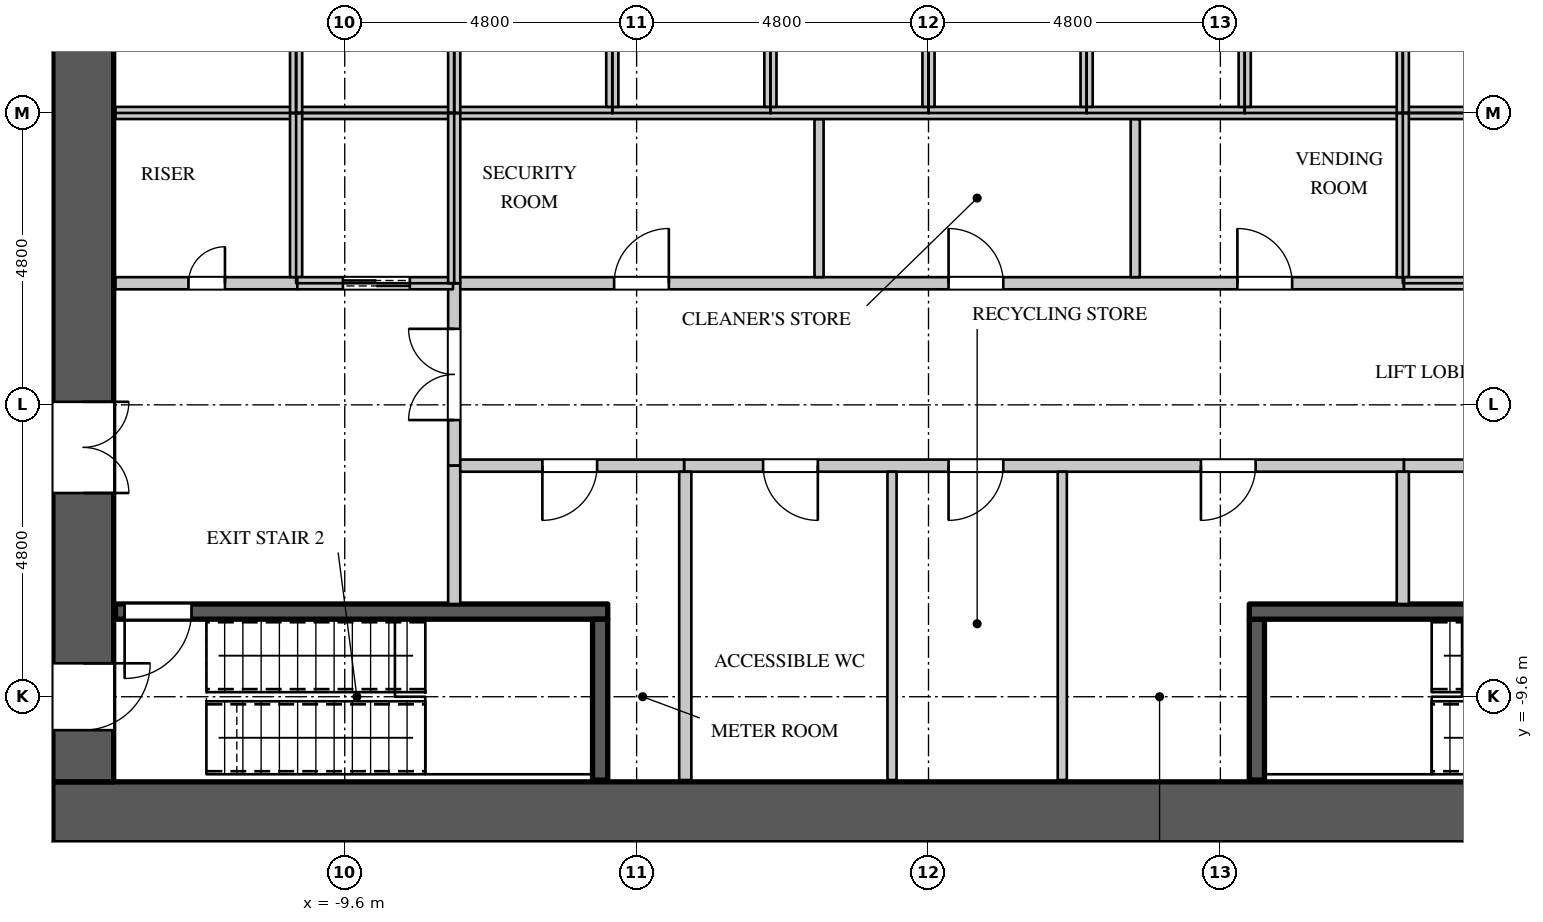
"""IFC4 building model, lengths in metres.
Left out: names, types, materials, properties, quantities, classifications, styles, units other than length and angle.
Written with IfcOpenShell. Run it as: python <this file> out.ifc"""

import sys

from ifc_helpers import new_model, si_unit, direction, frame, frame_2d, origin, place, context, subcontext, project, spatial, rectangle, extrude, element, fill, save


model = new_model("IFC4")
c1 = context("Model", 3, precision=1e-05, world=origin(), true_north=direction((0.0, 1.0)))
c2 = subcontext(c1, "Body", "Model", "MODEL_VIEW")
j1 = project(units=[si_unit("LENGTHUNIT", "METRE"), si_unit("PLANEANGLEUNIT", "RADIAN")], contexts=[c1])
p1 = place(None, origin())
s1 = spatial("IfcSite", under=j1, at=p1, CompositionType="ELEMENT")
p2 = place(p1, origin())
s2 = spatial("IfcBuilding", under=s1, at=p2, CompositionType="ELEMENT")
p3 = place(p2, frame((0.0, 0.0, 50.7)))
s3 = spatial("IfcBuildingStorey", under=s2, at=p3, CompositionType="ELEMENT", Elevation=50.7)
p4 = place(p3, frame((-14.4, -11.5, 0.0), z_axis=(0.0, 0.0, 1.0), x_axis=(1.0, 0.0, 0.0)))
e1 = element("IfcWall", 1, at=p4, inside=s3, PredefinedType="SHEAR", context=c2, shape_type="SweptSolid", body=[
    extrude(rectangle(XDim=28.8, YDim=1.0, at=frame_2d((14.4, 0.0))), origin(), (0.0, 0.0, 1.0), 4.2),
])
p5 = place(p3, frame((-13.9, -11.0, 0.0), z_axis=(0.0, 0.0, 1.0), x_axis=(0.0, 1.0, 0.0)))
e2 = element("IfcWall", 2, at=p5, inside=s3, PredefinedType="SHEAR", context=c2, shape_type="SweptSolid", body=[
    extrude(rectangle(XDim=22.0, YDim=1.0, at=frame_2d((11.0, 0.0))), origin(), (0.0, 0.0, 1.0), 4.2),
])
p6 = place(p5, frame((20.05, 0.0, 0.0)))
e3 = element("IfcOpeningElement", 3, at=p6, cuts=e2, PredefinedType="OPENING", context=c2, shape_type="SweptSolid", body=[
    extrude(rectangle(XDim=1.1, YDim=2.2, at=frame_2d((0.55, 1.1))), frame((0.0, 0.51, 0.0), z_axis=(0.0, -1.0, 0.0), x_axis=(1.0, 0.0, 0.0)), (0.0, 0.0, 1.0), 1.02),
])
p7 = place(p5, frame((0.85, 0.0, 0.0)))
e4 = element("IfcOpeningElement", 4, at=p7, cuts=e2, PredefinedType="OPENING", context=c2, shape_type="SweptSolid", body=[
    extrude(rectangle(XDim=1.1, YDim=2.2, at=frame_2d((0.55, 1.1))), frame((0.0, 0.51, 0.0), z_axis=(0.0, -1.0, 0.0), x_axis=(1.0, 0.0, 0.0)), (0.0, 0.0, 1.0), 1.02),
])
p8 = place(p5, frame((15.75, 0.0, 0.0)))
e5 = element("IfcOpeningElement", 5, at=p8, cuts=e2, PredefinedType="OPENING", context=c2, shape_type="SweptSolid", body=[
    extrude(rectangle(XDim=1.5, YDim=2.4, at=frame_2d((0.75, 1.2))), frame((0.0, 0.51, 0.0), z_axis=(0.0, -1.0, 0.0), x_axis=(1.0, 0.0, 0.0)), (0.0, 0.0, 1.0), 1.02),
])
p9 = place(p5, frame((4.75, 0.0, 0.0)))
e6 = element("IfcOpeningElement", 6, at=p9, cuts=e2, PredefinedType="OPENING", context=c2, shape_type="SweptSolid", body=[
    extrude(rectangle(XDim=1.5, YDim=2.4, at=frame_2d((0.75, 1.2))), frame((0.0, 0.51, 0.0), z_axis=(0.0, -1.0, 0.0), x_axis=(1.0, 0.0, 0.0)), (0.0, 0.0, 1.0), 1.02),
])
p10 = place(p3, frame((-7.82, -2.8, 0.0), z_axis=(0.0, 0.0, 1.0), x_axis=(1.0, 0.0, 0.0)))
e7 = element("IfcWall", 7, at=p10, inside=s3, PredefinedType="PARTITIONING", context=c2, shape_type="SweptSolid", body=[
    extrude(rectangle(XDim=15.64, YDim=0.2, at=frame_2d((7.82, 0.0))), origin(), (0.0, 0.0, 1.0), 3.95),
])
p11 = place(p10, frame((2.65, 0.0, 0.0)))
e8 = element("IfcOpeningElement", 8, at=p11, cuts=e7, PredefinedType="OPENING", context=c2, shape_type="SweptSolid", body=[
    extrude(rectangle(XDim=0.9, YDim=2.2, at=frame_2d((0.45, 1.1))), frame((0.0, 0.11, 0.0), z_axis=(0.0, -1.0, 0.0), x_axis=(1.0, 0.0, 0.0)), (0.0, 0.0, 1.0), 0.22),
])
p12 = place(p10, frame((8.15, 0.0, 0.0)))
e9 = element("IfcOpeningElement", 9, at=p12, cuts=e7, PredefinedType="OPENING", context=c2, shape_type="SweptSolid", body=[
    extrude(rectangle(XDim=0.9, YDim=2.2, at=frame_2d((0.45, 1.1))), frame((0.0, 0.11, 0.0), z_axis=(0.0, -1.0, 0.0), x_axis=(1.0, 0.0, 0.0)), (0.0, 0.0, 1.0), 0.22),
])
p13 = place(p10, frame((12.9, 0.0, 0.0)))
e10 = element("IfcOpeningElement", 10, at=p13, cuts=e7, PredefinedType="OPENING", context=c2, shape_type="SweptSolid", body=[
    extrude(rectangle(XDim=0.9, YDim=2.2, at=frame_2d((0.45, 1.1))), frame((0.0, 0.11, 0.0), z_axis=(0.0, -1.0, 0.0), x_axis=(1.0, 0.0, 0.0)), (0.0, 0.0, 1.0), 0.22),
])
p14 = place(p3, frame((-7.8, -5.8, 0.0), z_axis=(0.0, 0.0, 1.0), x_axis=(0.0, 1.0, 0.0)))
e11 = element("IfcWall", 11, at=p14, inside=s3, PredefinedType="PARTITIONING", context=c2, shape_type="SweptSolid", body=[
    extrude(rectangle(XDim=3.0, YDim=0.2, at=frame_2d((1.5, 0.0))), origin(), (0.0, 0.0, 1.0), 3.95),
])
p15 = place(p14, frame((0.75, 0.0, 0.0)))
e12 = element("IfcOpeningElement", 12, at=p15, cuts=e11, PredefinedType="OPENING", context=c2, shape_type="SweptSolid", body=[
    extrude(rectangle(XDim=1.5, YDim=2.4, at=frame_2d((0.75, 1.2))), frame((0.0, 0.11, 0.0), z_axis=(0.0, -1.0, 0.0), x_axis=(1.0, 0.0, 0.0)), (0.0, 0.0, 1.0), 0.22),
])
p16 = place(p3, frame((-4.02, -5.8, 0.0), z_axis=(0.0, 0.0, 1.0), x_axis=(1.0, 0.0, 0.0)))
e13 = element("IfcWall", 13, at=p16, inside=s3, PredefinedType="PARTITIONING", context=c2, shape_type="SweptSolid", body=[
    extrude(rectangle(XDim=11.84, YDim=0.2, at=frame_2d((5.92, 0.0))), origin(), (0.0, 0.0, 1.0), 3.95),
])
p17 = place(p16, frame((1.3, 0.0, 0.0)))
e14 = element("IfcOpeningElement", 14, at=p17, cuts=e13, PredefinedType="OPENING", context=c2, shape_type="SweptSolid", body=[
    extrude(rectangle(XDim=0.9, YDim=2.2, at=frame_2d((0.45, 1.1))), frame((0.0, 0.11, 0.0), z_axis=(0.0, -1.0, 0.0), x_axis=(1.0, 0.0, 0.0)), (0.0, 0.0, 1.0), 0.22),
])
p18 = place(p16, frame((4.35, 0.0, 0.0)))
e15 = element("IfcOpeningElement", 15, at=p18, cuts=e13, PredefinedType="OPENING", context=c2, shape_type="SweptSolid", body=[
    extrude(rectangle(XDim=0.9, YDim=2.2, at=frame_2d((0.45, 1.1))), frame((0.0, 0.11, 0.0), z_axis=(0.0, -1.0, 0.0), x_axis=(1.0, 0.0, 0.0)), (0.0, 0.0, 1.0), 0.22),
])
p19 = place(p16, frame((8.5, 0.0, 0.0)))
e16 = element("IfcOpeningElement", 16, at=p19, cuts=e13, PredefinedType="OPENING", context=c2, shape_type="SweptSolid", body=[
    extrude(rectangle(XDim=0.9, YDim=2.2, at=frame_2d((0.45, 1.1))), frame((0.0, 0.11, 0.0), z_axis=(0.0, -1.0, 0.0), x_axis=(1.0, 0.0, 0.0)), (0.0, 0.0, 1.0), 0.22),
])
p20 = place(p3, frame((-1.8, -2.7, 0.0), z_axis=(0.0, 0.0, 1.0), x_axis=(0.0, 1.0, 0.0)))
e17 = element("IfcWall", 17, at=p20, inside=s3, PredefinedType="PARTITIONING", context=c2, shape_type="SweptSolid", body=[
    extrude(rectangle(XDim=2.6, YDim=0.15, at=frame_2d((1.3, 0.0))), origin(), (0.0, 0.0, 1.0), 3.95),
])
for number, where, z_axis, x_axis in (
    (18, (-0.6, -10.97, 0.0), (0.0, 0.0, 1.0), (0.0, 1.0, 0.0)),
    (19, (2.2, -10.97, 0.0), (0.0, 0.0, 1.0), (0.0, 1.0, 0.0)),
):
    element("IfcWall", number, at=place(p3, frame(where, z_axis=z_axis, x_axis=x_axis)), inside=s3, PredefinedType="PARTITIONING", context=c2, shape_type="SweptSolid", body=[
        extrude(rectangle(XDim=5.07, YDim=0.15, at=frame_2d((2.535, 0.0))), origin(), (0.0, 0.0, 1.0), 3.95),
    ])
p21 = place(p3, frame((3.4, -2.7, 0.0), z_axis=(0.0, 0.0, 1.0), x_axis=(0.0, 1.0, 0.0)))
e20 = element("IfcWall", 20, at=p21, inside=s3, PredefinedType="PARTITIONING", context=c2, shape_type="SweptSolid", body=[
    extrude(rectangle(XDim=2.6, YDim=0.15, at=frame_2d((1.3, 0.0))), origin(), (0.0, 0.0, 1.0), 3.95),
])
p22 = place(p3, frame((-13.37, -2.8, 0.0), z_axis=(0.0, 0.0, 1.0), x_axis=(1.0, 0.0, 0.0)))
e21 = element("IfcWall", 21, at=p22, inside=s3, PredefinedType="PARTITIONING", context=c2, shape_type="SweptSolid", body=[
    extrude(rectangle(XDim=2.99, YDim=0.2, at=frame_2d((1.495, 0.0))), origin(), (0.0, 0.0, 1.0), 3.95),
])
p23 = place(p22, frame((1.2, 0.0, 0.0)))
e22 = element("IfcOpeningElement", 22, at=p23, cuts=e21, PredefinedType="OPENING", context=c2, shape_type="SweptSolid", body=[
    extrude(rectangle(XDim=0.6, YDim=2.0, at=frame_2d((0.3, 1.0))), frame((0.0, 0.11, 0.0), z_axis=(0.0, -1.0, 0.0), x_axis=(1.0, 0.0, 0.0)), (0.0, 0.0, 1.0), 0.22),
])
p24 = place(p3, frame((-7.8, -8.075, 0.0), z_axis=(0.0, 0.0, 1.0), x_axis=(0.0, 1.0, 0.0)))
e23 = element("IfcWall", 23, at=p24, inside=s3, PredefinedType="PARTITIONING", context=c2, shape_type="SweptSolid", body=[
    extrude(rectangle(XDim=2.275, YDim=0.2, at=frame_2d((1.137, 0.0))), origin(), (0.0, 0.0, 1.0), 3.95),
])
p25 = place(p3, frame((-7.7, -5.8, 0.0), z_axis=(0.0, 0.0, 1.0), x_axis=(1.0, 0.0, 0.0)))
e24 = element("IfcWall", 24, at=p25, inside=s3, PredefinedType="PARTITIONING", context=c2, shape_type="SweptSolid", body=[
    extrude(rectangle(XDim=3.68, YDim=0.2, at=frame_2d((1.84, 0.0))), origin(), (0.0, 0.0, 1.0), 3.95),
])
p26 = place(p25, frame((1.35, 0.0, 0.0)))
e25 = element("IfcOpeningElement", 25, at=p26, cuts=e24, PredefinedType="OPENING", context=c2, shape_type="SweptSolid", body=[
    extrude(rectangle(XDim=0.9, YDim=2.2, at=frame_2d((0.45, 1.1))), frame((0.0, 0.11, 0.0), z_axis=(0.0, -1.0, 0.0), x_axis=(1.0, 0.0, 0.0)), (0.0, 0.0, 1.0), 0.22),
])
p27 = place(p3, frame((-4.0, -10.97, 0.0), z_axis=(0.0, 0.0, 1.0), x_axis=(0.0, 1.0, 0.0)))
e26 = element("IfcWall", 26, at=p27, inside=s3, PredefinedType="PARTITIONING", context=c2, shape_type="SweptSolid", body=[
    extrude(rectangle(XDim=5.07, YDim=0.2, at=frame_2d((2.535, 0.0))), origin(), (0.0, 0.0, 1.0), 3.95),
])
p28 = place(p3, frame((7.82, -5.8, 0.0), z_axis=(0.0, 0.0, 1.0), x_axis=(1.0, 0.0, 0.0)))
e27 = element("IfcWall", 27, at=p28, inside=s3, PredefinedType="PARTITIONING", context=c2, shape_type="SweptSolid", body=[
    extrude(rectangle(XDim=5.55, YDim=0.2, at=frame_2d((2.775, 0.0))), origin(), (0.0, 0.0, 1.0), 3.95),
])
p29 = place(p28, frame((2.35, 0.0, 0.0)))
e28 = element("IfcOpeningElement", 28, at=p29, cuts=e27, PredefinedType="OPENING", context=c2, shape_type="SweptSolid", body=[
    extrude(rectangle(XDim=0.9, YDim=2.2, at=frame_2d((0.45, 1.1))), frame((0.0, 0.11, 0.0), z_axis=(0.0, -1.0, 0.0), x_axis=(1.0, 0.0, 0.0)), (0.0, 0.0, 1.0), 0.22),
])
p30 = place(p3, frame((7.8, -8.075, 0.0), z_axis=(0.0, 0.0, 1.0), x_axis=(0.0, 1.0, 0.0)))
e29 = element("IfcWall", 29, at=p30, inside=s3, PredefinedType="PARTITIONING", context=c2, shape_type="SweptSolid", body=[
    extrude(rectangle(XDim=2.175, YDim=0.2, at=frame_2d((1.087, 0.0))), origin(), (0.0, 0.0, 1.0), 3.95),
])
p31 = place(p3, frame((-13.37, 0.0, 0.0), z_axis=(0.0, 0.0, 1.0), x_axis=(1.0, 0.0, 0.0)))
e30 = element("IfcWall", 30, at=p31, inside=s3, PredefinedType="PARTITIONING", context=c2, shape_type="SweptSolid", body=[
    extrude(rectangle(XDim=23.77, YDim=0.2, at=frame_2d((11.885, 0.0))), origin(), (0.0, 0.0, 1.0), 3.95),
])
p32 = place(p3, frame((-10.4, -2.7, 0.0), z_axis=(0.0, 0.0, 1.0), x_axis=(0.0, 1.0, 0.0)))
e31 = element("IfcWall", 31, at=p32, inside=s3, PredefinedType="PARTITIONING", context=c2, shape_type="SweptSolid", body=[
    extrude(rectangle(XDim=2.7, YDim=0.2, at=frame_2d((1.35, 0.0))), origin(), (0.0, 0.0, 1.0), 3.95),
])
p33 = place(p3, frame((-10.38, -2.8, 0.0), z_axis=(0.0, 0.0, 1.0), x_axis=(1.0, 0.0, 0.0)))
e32 = element("IfcWall", 32, at=p33, inside=s3, PredefinedType="PARTITIONING", context=c2, shape_type="SweptSolid", body=[
    extrude(rectangle(XDim=2.56, YDim=0.2, at=frame_2d((1.28, 0.0))), origin(), (0.0, 0.0, 1.0), 3.95),
])
p34 = place(p33, frame((0.75, 0.0, 0.0)))
e33 = element("IfcOpeningElement", 33, at=p34, cuts=e32, PredefinedType="OPENING", context=c2, shape_type="SweptSolid", body=[
    extrude(rectangle(XDim=1.1, YDim=2.2, at=frame_2d((0.55, 1.1))), frame((0.0, 0.11, 0.0), z_axis=(0.0, -1.0, 0.0), x_axis=(1.0, 0.0, 0.0)), (0.0, 0.0, 1.0), 0.22),
])
p35 = place(p3, frame((-10.4, 0.0, 0.0), z_axis=(0.0, 0.0, 1.0), x_axis=(0.0, 1.0, 0.0)))
e34 = element("IfcWall", 34, at=p35, inside=s3, PredefinedType="PARTITIONING", context=c2, shape_type="SweptSolid", body=[
    extrude(rectangle(XDim=2.7, YDim=0.2, at=frame_2d((1.35, 0.0))), origin(), (0.0, 0.0, 1.0), 3.95),
])
for number, where, z_axis, x_axis in (
    (35, (-7.8, -2.8, 0.0), (0.0, 0.0, 1.0), (0.0, 1.0, 0.0)),
    (36, (-7.8, 0.0, 0.0), (0.0, 0.0, 1.0), (0.0, 1.0, 0.0)),
):
    element("IfcWall", number, at=place(p3, frame(where, z_axis=z_axis, x_axis=x_axis)), inside=s3, PredefinedType="PARTITIONING", context=c2, shape_type="SweptSolid", body=[
        extrude(rectangle(XDim=2.8, YDim=0.2, at=frame_2d((1.4, 0.0))), origin(), (0.0, 0.0, 1.0), 3.95),
    ])
for number, where, z_axis, x_axis in (
    (37, (-5.2, 0.1, 0.0), (0.0, 0.0, 1.0), (0.0, 1.0, 0.0)),
    (38, (-2.6, 0.1, 0.0), (0.0, 0.0, 1.0), (0.0, 1.0, 0.0)),
    (39, (0.0, 0.1, 0.0), (0.0, 0.0, 1.0), (0.0, 1.0, 0.0)),
    (40, (2.6, 0.1, 0.0), (0.0, 0.0, 1.0), (0.0, 1.0, 0.0)),
    (41, (5.2, 0.1, 0.0), (0.0, 0.0, 1.0), (0.0, 1.0, 0.0)),
):
    element("IfcWall", number, at=place(p3, frame(where, z_axis=z_axis, x_axis=x_axis)), inside=s3, PredefinedType="PARTITIONING", context=c2, shape_type="SweptSolid", body=[
        extrude(rectangle(XDim=2.6, YDim=0.2, at=frame_2d((1.3, 0.0))), origin(), (0.0, 0.0, 1.0), 3.95),
    ])
p36 = place(p3, frame((7.8, -2.7, 0.0), z_axis=(0.0, 0.0, 1.0), x_axis=(0.0, 1.0, 0.0)))
e42 = element("IfcWall", 42, at=p36, inside=s3, PredefinedType="PARTITIONING", context=c2, shape_type="SweptSolid", body=[
    extrude(rectangle(XDim=2.7, YDim=0.2, at=frame_2d((1.35, 0.0))), origin(), (0.0, 0.0, 1.0), 3.95),
])
p37 = place(p3, frame((7.82, -2.8, 0.0), z_axis=(0.0, 0.0, 1.0), x_axis=(1.0, 0.0, 0.0)))
e43 = element("IfcWall", 43, at=p37, inside=s3, PredefinedType="PARTITIONING", context=c2, shape_type="SweptSolid", body=[
    extrude(rectangle(XDim=2.56, YDim=0.2, at=frame_2d((1.28, 0.0))), origin(), (0.0, 0.0, 1.0), 3.95),
])
p38 = place(p3, frame((7.8, 0.0, 0.0), z_axis=(0.0, 0.0, 1.0), x_axis=(0.0, 1.0, 0.0)))
e44 = element("IfcWall", 44, at=p38, inside=s3, PredefinedType="PARTITIONING", context=c2, shape_type="SweptSolid", body=[
    extrude(rectangle(XDim=2.7, YDim=0.2, at=frame_2d((1.35, 0.0))), origin(), (0.0, 0.0, 1.0), 3.95),
])
p39 = place(p3, frame((-13.37, -8.2, 0.0), z_axis=(0.0, 0.0, 1.0), x_axis=(1.0, 0.0, 0.0)))
e45 = element("IfcWall", 45, at=p39, inside=s3, PredefinedType="SHEAR", context=c2, shape_type="SweptSolid", body=[
    extrude(rectangle(XDim=8.095, YDim=0.25, at=frame_2d((4.048, 0.0))), origin(), (0.0, 0.0, 1.0), 3.95),
])
p40 = place(p39, frame((0.15, 0.0, 0.0)))
e46 = element("IfcOpeningElement", 46, at=p40, cuts=e45, PredefinedType="OPENING", context=c2, shape_type="SweptSolid", body=[
    extrude(rectangle(XDim=1.1, YDim=2.2, at=frame_2d((0.55, 1.1))), frame((0.0, 0.135, 0.0), z_axis=(0.0, -1.0, 0.0), x_axis=(1.0, 0.0, 0.0)), (0.0, 0.0, 1.0), 0.27),
])
for number, where, z_axis, x_axis in (
    (47, (-5.4, -10.97, 0.0), (0.0, 0.0, 1.0), (0.0, 1.0, 0.0)),
    (48, (5.4, -10.97, 0.0), (0.0, 0.0, 1.0), (0.0, 1.0, 0.0)),
):
    element("IfcWall", number, at=place(p3, frame(where, z_axis=z_axis, x_axis=x_axis)), inside=s3, PredefinedType="SHEAR", context=c2, shape_type="SweptSolid", body=[
        extrude(rectangle(XDim=2.645, YDim=0.25, at=frame_2d((1.323, 0.0))), origin(), (0.0, 0.0, 1.0), 3.95),
    ])
p41 = place(p3, frame((5.275, -8.2, 0.0), z_axis=(0.0, 0.0, 1.0), x_axis=(1.0, 0.0, 0.0)))
e49 = element("IfcWall", 49, at=p41, inside=s3, PredefinedType="SHEAR", context=c2, shape_type="SweptSolid", body=[
    extrude(rectangle(XDim=8.095, YDim=0.25, at=frame_2d((4.048, 0.0))), origin(), (0.0, 0.0, 1.0), 3.95),
])
p42 = place(p23, origin())
e50 = element("IfcDoor", 50, at=p42, inside=s3, OperationType="SINGLE_SWING_RIGHT", PredefinedType="DOOR", context=c2, shape_type="SweptSolid", body=[
    extrude(rectangle(XDim=0.6, YDim=2.0, at=frame_2d((0.3, 1.0))), frame((0.0, 0.025, 0.0), z_axis=(0.0, -1.0, 0.0), x_axis=(1.0, 0.0, 0.0)), (0.0, 0.0, 1.0), 0.05),
])
fill(e22, e50)
p43 = place(p26, origin())
e51 = element("IfcDoor", 51, at=p43, inside=s3, OperationType="SINGLE_SWING_RIGHT", PredefinedType="DOOR", context=c2, shape_type="SweptSolid", body=[
    extrude(rectangle(XDim=0.9, YDim=2.2, at=frame_2d((0.45, 1.1))), frame((0.0, 0.025, 0.0), z_axis=(0.0, -1.0, 0.0), x_axis=(1.0, 0.0, 0.0)), (0.0, 0.0, 1.0), 0.05),
])
fill(e25, e51)
p44 = place(p17, origin())
e52 = element("IfcDoor", 52, at=p44, inside=s3, OperationType="SINGLE_SWING_LEFT", PredefinedType="DOOR", context=c2, shape_type="SweptSolid", body=[
    extrude(rectangle(XDim=0.9, YDim=2.2, at=frame_2d((0.45, 1.1))), frame((0.0, 0.025, 0.0), z_axis=(0.0, -1.0, 0.0), x_axis=(1.0, 0.0, 0.0)), (0.0, 0.0, 1.0), 0.05),
])
fill(e14, e52)
p45 = place(p18, origin())
e53 = element("IfcDoor", 53, at=p45, inside=s3, OperationType="SINGLE_SWING_RIGHT", PredefinedType="DOOR", context=c2, shape_type="SweptSolid", body=[
    extrude(rectangle(XDim=0.9, YDim=2.2, at=frame_2d((0.45, 1.1))), frame((0.0, 0.025, 0.0), z_axis=(0.0, -1.0, 0.0), x_axis=(1.0, 0.0, 0.0)), (0.0, 0.0, 1.0), 0.05),
])
fill(e15, e53)
p46 = place(p19, origin())
e54 = element("IfcDoor", 54, at=p46, inside=s3, OperationType="SINGLE_SWING_RIGHT", PredefinedType="DOOR", context=c2, shape_type="SweptSolid", body=[
    extrude(rectangle(XDim=0.9, YDim=2.2, at=frame_2d((0.45, 1.1))), frame((0.0, 0.025, 0.0), z_axis=(0.0, -1.0, 0.0), x_axis=(1.0, 0.0, 0.0)), (0.0, 0.0, 1.0), 0.05),
])
fill(e16, e54)
p47 = place(p11, origin())
e55 = element("IfcDoor", 55, at=p47, inside=s3, OperationType="SINGLE_SWING_RIGHT", PredefinedType="DOOR", context=c2, shape_type="SweptSolid", body=[
    extrude(rectangle(XDim=0.9, YDim=2.2, at=frame_2d((0.45, 1.1))), frame((0.0, 0.025, 0.0), z_axis=(0.0, -1.0, 0.0), x_axis=(1.0, 0.0, 0.0)), (0.0, 0.0, 1.0), 0.05),
])
fill(e8, e55)
p48 = place(p12, origin())
e56 = element("IfcDoor", 56, at=p48, inside=s3, OperationType="SINGLE_SWING_LEFT", PredefinedType="DOOR", context=c2, shape_type="SweptSolid", body=[
    extrude(rectangle(XDim=0.9, YDim=2.2, at=frame_2d((0.45, 1.1))), frame((0.0, 0.025, 0.0), z_axis=(0.0, -1.0, 0.0), x_axis=(1.0, 0.0, 0.0)), (0.0, 0.0, 1.0), 0.05),
])
fill(e9, e56)
p49 = place(p13, origin())
e57 = element("IfcDoor", 57, at=p49, inside=s3, OperationType="SINGLE_SWING_LEFT", PredefinedType="DOOR", context=c2, shape_type="SweptSolid", body=[
    extrude(rectangle(XDim=0.9, YDim=2.2, at=frame_2d((0.45, 1.1))), frame((0.0, 0.025, 0.0), z_axis=(0.0, -1.0, 0.0), x_axis=(1.0, 0.0, 0.0)), (0.0, 0.0, 1.0), 0.05),
])
fill(e10, e57)
p50 = place(p34, origin())
e58 = element("IfcDoor", 58, at=p50, inside=s3, OperationType="DOUBLE_DOOR_SLIDING", PredefinedType="DOOR", context=c2, shape_type="SweptSolid", body=[
    extrude(rectangle(XDim=1.1, YDim=2.2, at=frame_2d((0.55, 1.1))), frame((0.0, 0.025, 0.0), z_axis=(0.0, -1.0, 0.0), x_axis=(1.0, 0.0, 0.0)), (0.0, 0.0, 1.0), 0.05),
])
fill(e33, e58)
p51 = place(p40, origin())
e59 = element("IfcDoor", 59, at=p51, inside=s3, OperationType="SINGLE_SWING_RIGHT", PredefinedType="DOOR", context=c2, shape_type="SweptSolid", body=[
    extrude(rectangle(XDim=1.1, YDim=2.2, at=frame_2d((0.55, 1.1))), frame((0.0, 0.025, 0.0), z_axis=(0.0, -1.0, 0.0), x_axis=(1.0, 0.0, 0.0)), (0.0, 0.0, 1.0), 0.05),
])
fill(e46, e59)
p52 = place(p15, origin())
e60 = element("IfcDoor", 60, at=p52, inside=s3, OperationType="DOUBLE_DOOR_SINGLE_SWING", PredefinedType="DOOR", context=c2, shape_type="SweptSolid", body=[
    extrude(rectangle(XDim=1.5, YDim=2.4, at=frame_2d((0.75, 1.2))), frame((0.0, 0.025, 0.0), z_axis=(0.0, -1.0, 0.0), x_axis=(1.0, 0.0, 0.0)), (0.0, 0.0, 1.0), 0.05),
])
fill(e12, e60)
p53 = place(p7, origin())
e61 = element("IfcDoor", 61, at=p53, inside=s3, OperationType="SINGLE_SWING_LEFT", PredefinedType="DOOR", context=c2, shape_type="SweptSolid", body=[
    extrude(rectangle(XDim=1.1, YDim=2.2, at=frame_2d((0.55, 1.1))), frame((0.0, -0.445, 0.0), z_axis=(0.0, -1.0, 0.0), x_axis=(1.0, 0.0, 0.0)), (0.0, 0.0, 1.0), 0.05),
])
fill(e4, e61)
p54 = place(p9, origin())
e62 = element("IfcDoor", 62, at=p54, inside=s3, OperationType="DOUBLE_DOOR_SINGLE_SWING", PredefinedType="DOOR", context=c2, shape_type="SweptSolid", body=[
    extrude(rectangle(XDim=1.5, YDim=2.4, at=frame_2d((0.75, 1.2))), frame((0.0, -0.445, 0.0), z_axis=(0.0, -1.0, 0.0), x_axis=(1.0, 0.0, 0.0)), (0.0, 0.0, 1.0), 0.05),
])
fill(e6, e62)
save(model, sys.argv[1])
